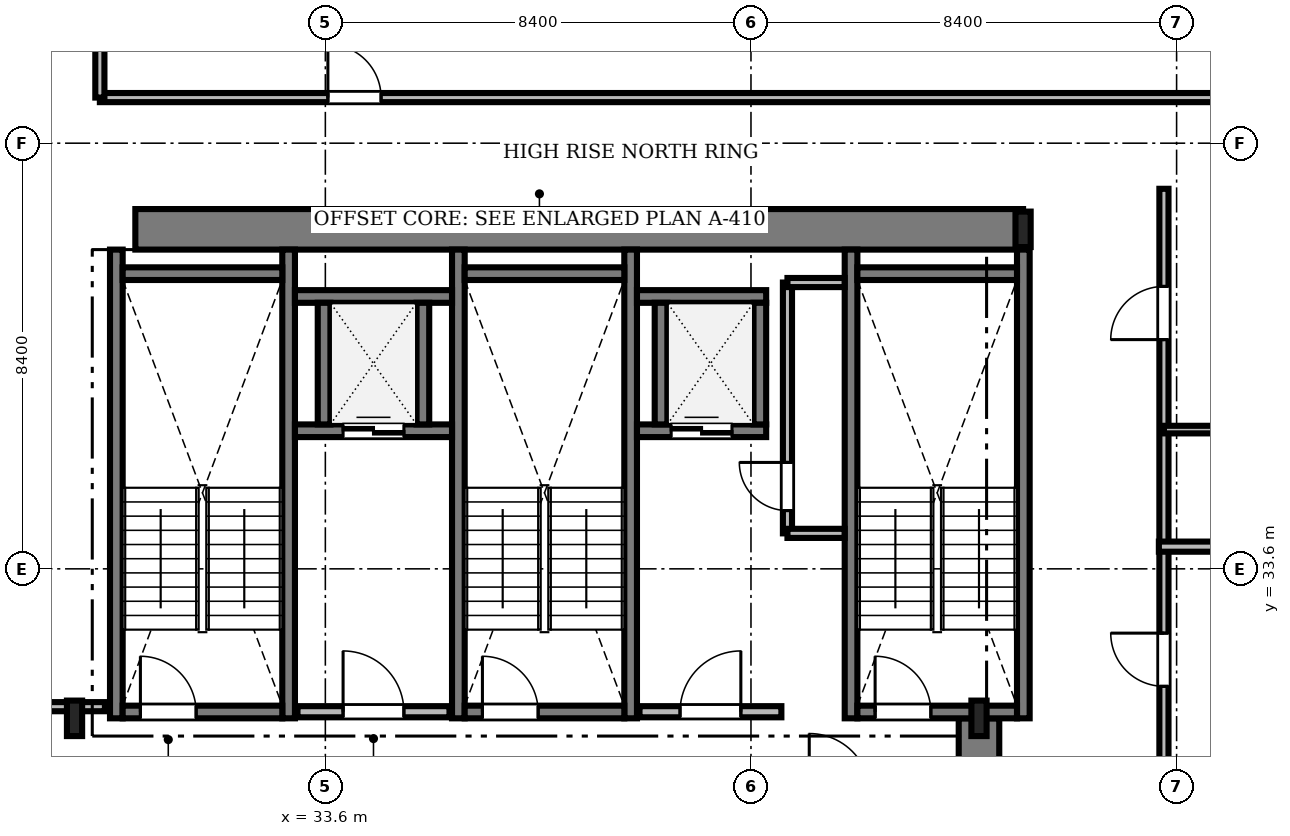
"""IFC4 building model, lengths in metres.
Left out: names, types, materials, properties, quantities, classifications, styles, units other than length and angle.
Written with IfcOpenShell. Run it as: python <this file> out.ifc"""

import sys

from ifc_helpers import new_model, si_unit, direction, frame, frame_2d, origin, origin_2d, place, context, subcontext, project, spatial, rectangle, i_section, extrude, source, transform, mapped, element, fill, save


model = new_model("IFC4")
c1 = context("Model", 3, precision=1e-05, world=origin(), true_north=direction((0.0, 1.0)))
c2 = subcontext(c1, "Body", "Model", "MODEL_VIEW")
j1 = project(units=[si_unit("LENGTHUNIT", "METRE"), si_unit("PLANEANGLEUNIT", "RADIAN")], contexts=[c1])
p1 = place(None, origin())
s1 = spatial("IfcSite", under=j1, at=p1, CompositionType="ELEMENT")
p2 = place(p1, origin())
s2 = spatial("IfcBuilding", under=s1, at=p2, CompositionType="ELEMENT")
p3 = place(p2, frame((0.0, 0.0, 214.8)))
s3 = spatial("IfcBuildingStorey", under=s2, at=p3, CompositionType="ELEMENT", Elevation=214.8)
m1 = source(origin(), c2, "Body", "SweptSolid", [
    extrude(rectangle(XDim=17.52, YDim=0.8, at=frame_2d((8.76, 0.0))), origin(), (0.0, 0.0, 1.0), 3.53),
])
p4 = place(p3, frame((29.85, 40.3, 0.0), z_axis=(0.0, 0.0, 1.0), x_axis=(1.0, 0.0, 0.0)))
e1 = element("IfcWall", 1, at=p4, inside=s3, PredefinedType="SHEAR", context=c2, shape_type="MappedRepresentation", body=[
    mapped(m1, transform((0.0, 0.0, 0.0), scale=1.0)),
])
m2 = source(origin(), c2, "Body", "SweptSolid", [
    extrude(rectangle(XDim=13.15, YDim=0.8, at=frame_2d((6.575, 0.0))), origin(), (0.0, 0.0, 1.0), 3.53),
])
p5 = place(p3, frame((46.5, 17.5, 0.0), z_axis=(0.0, 0.0, 1.0), x_axis=(0.0, 1.0, 0.0)))
e2 = element("IfcWall", 2, at=p5, inside=s3, PredefinedType="SHEAR", context=c2, shape_type="MappedRepresentation", body=[
    mapped(m2, transform((0.0, 0.0, 0.0), scale=1.0)),
])
m3 = source(origin(), c2, "Body", "SweptSolid", [
    extrude(i_section(OverallWidth=0.3, OverallDepth=0.7, WebThickness=0.017, FlangeThickness=0.032, FilletRadius=0.027, at=origin_2d()), origin(), (0.0, 0.0, 1.0), 3.53),
])
for number, where, z_axis, x_axis in (
    (3, (28.65, 30.65, 0.0), (0.0, 0.0, 1.0), (1.0, 0.0, 0.0)),
    (4, (46.5, 30.65, 0.0), (0.0, 0.0, 1.0), (1.0, 0.0, 0.0)),
    (5, (47.37, 40.3, 0.0), (0.0, 0.0, 1.0), (1.0, 0.0, 0.0)),
):
    element("IfcColumn", number, at=place(p3, frame(where, z_axis=z_axis, x_axis=x_axis)), inside=s3, PredefinedType="COLUMN", context=c2, shape_type="MappedRepresentation", body=[
        mapped(m3, transform((0.0, 0.0, 0.0), scale=1.0)),
    ])
m4 = source(origin(), c2, "Body", "SweptSolid", [
    extrude(rectangle(XDim=9.25, YDim=0.25, at=frame_2d((4.625, 0.0))), origin(), (0.0, 0.0, 1.0), 3.55),
])
for number, where, z_axis, x_axis in (
    (6, (29.475, 30.65, 0.0), (0.0, 0.0, 1.0), (0.0, 1.0, 0.0)),
    (7, (32.875, 30.65, 0.0), (0.0, 0.0, 1.0), (0.0, 1.0, 0.0)),
):
    element("IfcWall", number, at=place(p3, frame(where, z_axis=z_axis, x_axis=x_axis)), inside=s3, PredefinedType="SOLIDWALL", context=c2, shape_type="MappedRepresentation", body=[
        mapped(m4, transform((0.0, 0.0, 0.0), scale=1.0)),
    ])
m5 = source(origin(), c2, "Body", "SweptSolid", [
    extrude(rectangle(XDim=3.15, YDim=0.25, at=frame_2d((1.575, 0.0))), origin(), (0.0, 0.0, 1.0), 3.55),
])
p6 = place(p3, frame((29.6, 39.425, 0.0), z_axis=(0.0, 0.0, 1.0), x_axis=(1.0, 0.0, 0.0)))
e8 = element("IfcWall", 8, at=p6, inside=s3, PredefinedType="SOLIDWALL", context=c2, shape_type="MappedRepresentation", body=[
    mapped(m5, transform((0.0, 0.0, 0.0), scale=1.0)),
])
p7 = place(p3, frame((29.6, 30.775, 0.0), z_axis=(0.0, 0.0, 1.0), x_axis=(1.0, 0.0, 0.0)))
e9 = element("IfcWall", 9, at=p7, inside=s3, PredefinedType="SOLIDWALL", context=c2, shape_type="MappedRepresentation", body=[
    mapped(m5, transform((0.0, 0.0, 0.0), scale=1.0)),
])
m6 = source(origin(), c2, "Body", "SweptSolid", [
    extrude(rectangle(XDim=1.1, YDim=2.2, at=frame_2d((0.55, 1.1))), frame((0.0, 0.135, 0.0), z_axis=(0.0, -1.0, 0.0), x_axis=(1.0, 0.0, 0.0)), (0.0, 0.0, 1.0), 0.27),
])
p8 = place(p7, frame((0.35, 0.0, 0.0)))
e10 = element("IfcOpeningElement", 10, at=p8, cuts=e9, PredefinedType="OPENING", context=c2, shape_type="MappedRepresentation", body=[
    mapped(m6, transform((0.0, 0.0, 0.0), scale=1.0)),
])
for number, where, z_axis, x_axis in (
    (11, (36.225, 30.65, 0.0), (0.0, 0.0, 1.0), (0.0, 1.0, 0.0)),
    (12, (39.625, 30.65, 0.0), (0.0, 0.0, 1.0), (0.0, 1.0, 0.0)),
):
    element("IfcWall", number, at=place(p3, frame(where, z_axis=z_axis, x_axis=x_axis)), inside=s3, PredefinedType="SOLIDWALL", context=c2, shape_type="MappedRepresentation", body=[
        mapped(m4, transform((0.0, 0.0, 0.0), scale=1.0)),
    ])
p9 = place(p3, frame((36.35, 39.425, 0.0), z_axis=(0.0, 0.0, 1.0), x_axis=(1.0, 0.0, 0.0)))
e13 = element("IfcWall", 13, at=p9, inside=s3, PredefinedType="SOLIDWALL", context=c2, shape_type="MappedRepresentation", body=[
    mapped(m5, transform((0.0, 0.0, 0.0), scale=1.0)),
])
p10 = place(p3, frame((36.35, 30.775, 0.0), z_axis=(0.0, 0.0, 1.0), x_axis=(1.0, 0.0, 0.0)))
e14 = element("IfcWall", 14, at=p10, inside=s3, PredefinedType="SOLIDWALL", context=c2, shape_type="MappedRepresentation", body=[
    mapped(m5, transform((0.0, 0.0, 0.0), scale=1.0)),
])
p11 = place(p10, frame((0.35, 0.0, 0.0)))
e15 = element("IfcOpeningElement", 15, at=p11, cuts=e14, PredefinedType="OPENING", context=c2, shape_type="MappedRepresentation", body=[
    mapped(m6, transform((0.0, 0.0, 0.0), scale=1.0)),
])
for number, where, z_axis, x_axis in (
    (16, (43.975, 30.65, 0.0), (0.0, 0.0, 1.0), (0.0, 1.0, 0.0)),
    (17, (47.375, 30.65, 0.0), (0.0, 0.0, 1.0), (0.0, 1.0, 0.0)),
):
    element("IfcWall", number, at=place(p3, frame(where, z_axis=z_axis, x_axis=x_axis)), inside=s3, PredefinedType="SOLIDWALL", context=c2, shape_type="MappedRepresentation", body=[
        mapped(m4, transform((0.0, 0.0, 0.0), scale=1.0)),
    ])
p12 = place(p3, frame((44.1, 39.425, 0.0), z_axis=(0.0, 0.0, 1.0), x_axis=(1.0, 0.0, 0.0)))
e18 = element("IfcWall", 18, at=p12, inside=s3, PredefinedType="SOLIDWALL", context=c2, shape_type="MappedRepresentation", body=[
    mapped(m5, transform((0.0, 0.0, 0.0), scale=1.0)),
])
p13 = place(p3, frame((44.1, 30.775, 0.0), z_axis=(0.0, 0.0, 1.0), x_axis=(1.0, 0.0, 0.0)))
e19 = element("IfcWall", 19, at=p13, inside=s3, PredefinedType="SOLIDWALL", context=c2, shape_type="MappedRepresentation", body=[
    mapped(m5, transform((0.0, 0.0, 0.0), scale=1.0)),
])
p14 = place(p13, frame((0.35, 0.0, 0.0)))
e20 = element("IfcOpeningElement", 20, at=p14, cuts=e19, PredefinedType="OPENING", context=c2, shape_type="MappedRepresentation", body=[
    mapped(m6, transform((0.0, 0.0, 0.0), scale=1.0)),
])
m7 = source(origin(), c2, "Body", "SweptSolid", [
    extrude(rectangle(XDim=3.0, YDim=0.22, at=frame_2d((1.5, 0.0))), origin(), (0.0, 0.0, 1.0), 3.53),
])
p15 = place(p3, frame((33.05, 30.78, 0.0), z_axis=(0.0, 0.0, 1.0), x_axis=(1.0, 0.0, 0.0)))
e21 = element("IfcWall", 21, at=p15, inside=s3, PredefinedType="SOLIDWALL", context=c2, shape_type="MappedRepresentation", body=[
    mapped(m7, transform((0.0, 0.0, 0.0), scale=1.0)),
])
m8 = source(origin(), c2, "Body", "SweptSolid", [
    extrude(rectangle(XDim=1.2, YDim=2.2, at=frame_2d((0.6, 1.1))), frame((0.0, 0.12, 0.0), z_axis=(0.0, -1.0, 0.0), x_axis=(1.0, 0.0, 0.0)), (0.0, 0.0, 1.0), 0.24),
])
p16 = place(p15, frame((0.9, 0.0, 0.0)))
e22 = element("IfcOpeningElement", 22, at=p16, cuts=e21, PredefinedType="OPENING", context=c2, shape_type="MappedRepresentation", body=[
    mapped(m8, transform((0.0, 0.0, 0.0), scale=1.0)),
])
m9 = source(origin(), c2, "Body", "SweptSolid", [
    extrude(rectangle(XDim=2.8, YDim=0.22, at=frame_2d((1.4, 0.0))), origin(), (0.0, 0.0, 1.0), 3.53),
])
p17 = place(p3, frame((39.8, 30.78, 0.0), z_axis=(0.0, 0.0, 1.0), x_axis=(1.0, 0.0, 0.0)))
e23 = element("IfcWall", 23, at=p17, inside=s3, PredefinedType="SOLIDWALL", context=c2, shape_type="MappedRepresentation", body=[
    mapped(m9, transform((0.0, 0.0, 0.0), scale=1.0)),
])
p18 = place(p17, frame((0.8, 0.0, 0.0)))
e24 = element("IfcOpeningElement", 24, at=p18, cuts=e23, PredefinedType="OPENING", context=c2, shape_type="MappedRepresentation", body=[
    mapped(m8, transform((0.0, 0.0, 0.0), scale=1.0)),
])
m10 = source(origin(), c2, "Body", "SweptSolid", [
    extrude(rectangle(XDim=3.1, YDim=0.25, at=frame_2d((1.55, 0.0))), origin(), (0.0, 0.0, 1.0), 3.53),
])
p19 = place(p3, frame((33.0, 36.325, 0.0), z_axis=(0.0, 0.0, 1.0), x_axis=(1.0, 0.0, 0.0)))
e25 = element("IfcWall", 25, at=p19, inside=s3, PredefinedType="SOLIDWALL", context=c2, shape_type="MappedRepresentation", body=[
    mapped(m10, transform((0.0, 0.0, 0.0), scale=1.0)),
])
m11 = source(origin(), c2, "Body", "SweptSolid", [
    extrude(rectangle(XDim=1.2, YDim=2.25, at=frame_2d((0.6, 1.125))), frame((0.0, 0.135, 0.0), z_axis=(0.0, -1.0, 0.0), x_axis=(1.0, 0.0, 0.0)), (0.0, 0.0, 1.0), 0.27),
])
p20 = place(p19, frame((0.95, 0.0, 0.0)))
e26 = element("IfcOpeningElement", 26, at=p20, cuts=e25, PredefinedType="OPENING", context=c2, shape_type="MappedRepresentation", body=[
    mapped(m11, transform((0.0, 0.0, 0.0), scale=1.0)),
])
p21 = place(p3, frame((33.0, 38.975, 0.0), z_axis=(0.0, 0.0, 1.0), x_axis=(1.0, 0.0, 0.0)))
e27 = element("IfcWall", 27, at=p21, inside=s3, PredefinedType="SOLIDWALL", context=c2, shape_type="MappedRepresentation", body=[
    mapped(m10, transform((0.0, 0.0, 0.0), scale=1.0)),
])
m12 = source(origin(), c2, "Body", "SweptSolid", [
    extrude(rectangle(XDim=2.4, YDim=0.25, at=frame_2d((1.2, 0.0))), origin(), (0.0, 0.0, 1.0), 3.53),
])
for number, where, z_axis, x_axis in (
    (28, (33.575, 36.45, 0.0), (0.0, 0.0, 1.0), (0.0, 1.0, 0.0)),
    (29, (35.525, 36.45, 0.0), (0.0, 0.0, 1.0), (0.0, 1.0, 0.0)),
):
    element("IfcWall", number, at=place(p3, frame(where, z_axis=z_axis, x_axis=x_axis)), inside=s3, PredefinedType="SOLIDWALL", context=c2, shape_type="MappedRepresentation", body=[
        mapped(m12, transform((0.0, 0.0, 0.0), scale=1.0)),
    ])
m13 = source(origin(), c2, "Body", "SweptSolid", [
    extrude(rectangle(XDim=2.55, YDim=0.25, at=frame_2d((1.275, 0.0))), origin(), (0.0, 0.0, 1.0), 3.53),
])
p22 = place(p3, frame((39.75, 36.325, 0.0), z_axis=(0.0, 0.0, 1.0), x_axis=(1.0, 0.0, 0.0)))
e30 = element("IfcWall", 30, at=p22, inside=s3, PredefinedType="SOLIDWALL", context=c2, shape_type="MappedRepresentation", body=[
    mapped(m13, transform((0.0, 0.0, 0.0), scale=1.0)),
])
p23 = place(p22, frame((0.675, 0.0, 0.0)))
e31 = element("IfcOpeningElement", 31, at=p23, cuts=e30, PredefinedType="OPENING", context=c2, shape_type="MappedRepresentation", body=[
    mapped(m11, transform((0.0, 0.0, 0.0), scale=1.0)),
])
p24 = place(p3, frame((39.75, 38.975, 0.0), z_axis=(0.0, 0.0, 1.0), x_axis=(1.0, 0.0, 0.0)))
e32 = element("IfcWall", 32, at=p24, inside=s3, PredefinedType="SOLIDWALL", context=c2, shape_type="MappedRepresentation", body=[
    mapped(m13, transform((0.0, 0.0, 0.0), scale=1.0)),
])
for number, where, z_axis, x_axis in (
    (33, (40.225, 36.45, 0.0), (0.0, 0.0, 1.0), (0.0, 1.0, 0.0)),
    (34, (42.175, 36.45, 0.0), (0.0, 0.0, 1.0), (0.0, 1.0, 0.0)),
):
    element("IfcWall", number, at=place(p3, frame(where, z_axis=z_axis, x_axis=x_axis)), inside=s3, PredefinedType="SOLIDWALL", context=c2, shape_type="MappedRepresentation", body=[
        mapped(m12, transform((0.0, 0.0, 0.0), scale=1.0)),
    ])
m14 = source(origin(), c2, "Body", "SweptSolid", [
    extrude(rectangle(XDim=28.428, YDim=0.18, at=frame_2d((14.214, 0.0))), origin(), (0.0, 0.0, 1.0), 2.772),
])
p25 = place(p3, frame((29.15, 42.9, 0.0), z_axis=(0.0, 0.0, 1.0), x_axis=(1.0, 0.0, 0.0)))
e35 = element("IfcWall", 35, at=p25, inside=s3, PredefinedType="PARTITIONING", context=c2, shape_type="MappedRepresentation", body=[
    mapped(m14, transform((0.0, 0.0, 0.0), scale=1.0)),
])
m15 = source(origin(), c2, "Body", "SweptSolid", [
    extrude(rectangle(XDim=1.05, YDim=2.2, at=frame_2d((0.525, 1.1))), frame((0.0, 0.1, 0.0), z_axis=(0.0, -1.0, 0.0), x_axis=(1.0, 0.0, 0.0)), (0.0, 0.0, 1.0), 0.2),
])
p26 = place(p25, frame((4.5, 0.0, 0.0)))
e36 = element("IfcOpeningElement", 36, at=p26, cuts=e35, PredefinedType="OPENING", context=c2, shape_type="MappedRepresentation", body=[
    mapped(m15, transform((0.0, 0.0, 0.0), scale=1.0)),
])
m16 = source(origin(), c2, "Body", "SweptSolid", [
    extrude(rectangle(XDim=27.59, YDim=0.18, at=frame_2d((13.795, 0.0))), origin(), (0.0, 0.0, 1.0), 2.972),
])
p27 = place(p3, frame((50.15, 13.51, 0.0), z_axis=(0.0, 0.0, 1.0), x_axis=(0.0, 1.0, 0.0)))
e37 = element("IfcWall", 37, at=p27, inside=s3, PredefinedType="PARTITIONING", context=c2, shape_type="MappedRepresentation", body=[
    mapped(m16, transform((0.0, 0.0, 0.0), scale=1.0)),
])
p28 = place(p27, frame((4.086, 0.0, 0.0)))
e38 = element("IfcOpeningElement", 38, at=p28, cuts=e37, PredefinedType="OPENING", context=c2, shape_type="MappedRepresentation", body=[
    mapped(m15, transform((0.0, 0.0, 0.0), scale=1.0)),
])
p29 = place(p27, frame((9.744, 0.0, 0.0)))
e39 = element("IfcOpeningElement", 39, at=p29, cuts=e37, PredefinedType="OPENING", context=c2, shape_type="MappedRepresentation", body=[
    mapped(m15, transform((0.0, 0.0, 0.0), scale=1.0)),
])
p30 = place(p27, frame((17.771, 0.0, 0.0)))
e40 = element("IfcOpeningElement", 40, at=p30, cuts=e37, PredefinedType="OPENING", context=c2, shape_type="MappedRepresentation", body=[
    mapped(m15, transform((0.0, 0.0, 0.0), scale=1.0)),
])
p31 = place(p27, frame((24.614, 0.0, 0.0)))
e41 = element("IfcOpeningElement", 41, at=p31, cuts=e37, PredefinedType="OPENING", context=c2, shape_type="MappedRepresentation", body=[
    mapped(m15, transform((0.0, 0.0, 0.0), scale=1.0)),
])
m17 = source(origin(), c2, "Body", "SweptSolid", [
    extrude(rectangle(XDim=17.828, YDim=0.18, at=frame_2d((8.914, 0.0))), origin(), (0.0, 0.0, 1.0), 2.772),
])
p32 = place(p3, frame((11.422, 30.88, 0.0), z_axis=(0.0, 0.0, 1.0), x_axis=(1.0, 0.0, 0.0)))
e42 = element("IfcWall", 42, at=p32, inside=s3, PredefinedType="PARTITIONING", context=c2, shape_type="MappedRepresentation", body=[
    mapped(m17, transform((0.0, 0.0, 0.0), scale=1.0)),
])
p33 = place(p32, frame((10.778, 0.0, 0.0)))
e43 = element("IfcOpeningElement", 43, at=p33, cuts=e42, PredefinedType="OPENING", context=c2, shape_type="MappedRepresentation", body=[
    mapped(m15, transform((0.0, 0.0, 0.0), scale=1.0)),
])
m18 = source(origin(), c2, "Body", "SweptSolid", [
    extrude(rectangle(XDim=4.95, YDim=0.18, at=frame_2d((2.475, 0.0))), origin(), (0.0, 0.0, 1.0), 3.53),
])
p34 = place(p3, frame((42.72, 34.3, 0.0), z_axis=(0.0, 0.0, 1.0), x_axis=(0.0, 1.0, 0.0)))
e44 = element("IfcWall", 44, at=p34, inside=s3, PredefinedType="PARTITIONING", context=c2, shape_type="MappedRepresentation", body=[
    mapped(m18, transform((0.0, 0.0, 0.0), scale=1.0)),
])
m19 = source(origin(), c2, "Body", "SweptSolid", [
    extrude(rectangle(XDim=0.95, YDim=2.15, at=frame_2d((0.475, 1.075))), frame((0.0, 0.1, 0.0), z_axis=(0.0, -1.0, 0.0), x_axis=(1.0, 0.0, 0.0)), (0.0, 0.0, 1.0), 0.2),
])
p35 = place(p34, frame((0.45, 0.0, 0.0)))
e45 = element("IfcOpeningElement", 45, at=p35, cuts=e44, PredefinedType="OPENING", context=c2, shape_type="MappedRepresentation", body=[
    mapped(m19, transform((0.0, 0.0, 0.0), scale=1.0)),
])
m20 = source(origin(), c2, "Body", "SweptSolid", [
    extrude(rectangle(XDim=7.528, YDim=0.2, at=frame_2d((3.764, 0.0))), origin(), (0.0, 0.0, 1.0), 2.772),
])
p36 = place(p3, frame((50.05, 34.038, 0.0), z_axis=(0.0, 0.0, 1.0), x_axis=(1.0, 0.0, 0.0)))
e46 = element("IfcWall", 46, at=p36, inside=s3, PredefinedType="PARTITIONING", context=c2, shape_type="MappedRepresentation", body=[
    mapped(m20, transform((0.0, 0.0, 0.0), scale=1.0)),
])
m21 = source(origin(), c2, "Body", "SweptSolid", [
    extrude(rectangle(XDim=5.378, YDim=0.18, at=frame_2d((2.689, 0.0))), origin(), (0.0, 0.0, 1.0), 2.772),
])
p37 = place(p3, frame((29.15, 42.9, 0.0), z_axis=(0.0, 0.0, 1.0), x_axis=(0.0, 1.0, 0.0)))
e47 = element("IfcWall", 47, at=p37, inside=s3, PredefinedType="PARTITIONING", context=c2, shape_type="MappedRepresentation", body=[
    mapped(m21, transform((0.0, 0.0, 0.0), scale=1.0)),
])
m22 = source(origin(), c2, "Body", "SweptSolid", [
    extrude(rectangle(XDim=2.36, YDim=0.15, at=frame_2d((1.18, 0.0))), origin(), (0.0, 0.0, 1.0), 3.53),
])
p38 = place(p3, frame((50.15, 36.348, 0.0), z_axis=(0.0, 0.0, 1.0), x_axis=(1.0, 0.0, 0.0)))
e48 = element("IfcWall", 48, at=p38, inside=s3, PredefinedType="PARTITIONING", context=c2, shape_type="MappedRepresentation", body=[
    mapped(m22, transform((0.0, 0.0, 0.0), scale=1.0)),
])
m23 = source(origin(), c2, "Body", "SweptSolid", [
    extrude(rectangle(XDim=1.128, YDim=0.18, at=frame_2d((0.564, 0.0))), origin(), (0.0, 0.0, 1.0), 3.53),
])
for number, where, z_axis, x_axis in (
    (49, (42.72, 34.3, 0.0), (0.0, 0.0, 1.0), (1.0, 0.0, 0.0)),
    (50, (42.72, 39.25, 0.0), (0.0, 0.0, 1.0), (1.0, 0.0, 0.0)),
):
    element("IfcWall", number, at=place(p3, frame(where, z_axis=z_axis, x_axis=x_axis)), inside=s3, PredefinedType="PARTITIONING", context=c2, shape_type="MappedRepresentation", body=[
        mapped(m23, transform((0.0, 0.0, 0.0), scale=1.0)),
    ])
m24 = source(origin(), c2, "Body", "SweptSolid", [
    extrude(rectangle(XDim=1.1, YDim=2.2, at=frame_2d((0.55, 1.1))), frame((0.0, 0.025, 0.0), z_axis=(0.0, -1.0, 0.0), x_axis=(1.0, 0.0, 0.0)), (0.0, 0.0, 1.0), 0.05),
])
p39 = place(p8, origin())
e51 = element("IfcDoor", 51, at=p39, inside=s3, OperationType="SINGLE_SWING_LEFT", PredefinedType="DOOR", context=c2, shape_type="MappedRepresentation", body=[
    mapped(m24, transform((0.0, 0.0, 0.0), scale=1.0)),
])
fill(e10, e51)
p40 = place(p11, origin())
e52 = element("IfcDoor", 52, at=p40, inside=s3, OperationType="SINGLE_SWING_LEFT", PredefinedType="DOOR", context=c2, shape_type="MappedRepresentation", body=[
    mapped(m24, transform((0.0, 0.0, 0.0), scale=1.0)),
])
fill(e15, e52)
p41 = place(p14, origin())
e53 = element("IfcDoor", 53, at=p41, inside=s3, OperationType="SINGLE_SWING_LEFT", PredefinedType="DOOR", context=c2, shape_type="MappedRepresentation", body=[
    mapped(m24, transform((0.0, 0.0, 0.0), scale=1.0)),
])
fill(e20, e53)
m25 = source(origin(), c2, "Body", "SweptSolid", [
    extrude(rectangle(XDim=1.2, YDim=2.2, at=frame_2d((0.6, 1.1))), frame((0.0, 0.025, 0.0), z_axis=(0.0, -1.0, 0.0), x_axis=(1.0, 0.0, 0.0)), (0.0, 0.0, 1.0), 0.05),
])
p42 = place(p16, origin())
e54 = element("IfcDoor", 54, at=p42, inside=s3, OperationType="SINGLE_SWING_LEFT", PredefinedType="DOOR", context=c2, shape_type="MappedRepresentation", body=[
    mapped(m25, transform((0.0, 0.0, 0.0), scale=1.0)),
])
fill(e22, e54)
p43 = place(p18, origin())
e55 = element("IfcDoor", 55, at=p43, inside=s3, OperationType="SINGLE_SWING_RIGHT", PredefinedType="DOOR", context=c2, shape_type="MappedRepresentation", body=[
    mapped(m25, transform((0.0, 0.0, 0.0), scale=1.0)),
])
fill(e24, e55)
m26 = source(origin(), c2, "Body", "SweptSolid", [
    extrude(rectangle(XDim=1.2, YDim=2.25, at=frame_2d((0.6, 1.125))), frame((0.0, 0.025, 0.0), z_axis=(0.0, -1.0, 0.0), x_axis=(1.0, 0.0, 0.0)), (0.0, 0.0, 1.0), 0.05),
])
p44 = place(p20, origin())
e56 = element("IfcDoor", 56, at=p44, inside=s3, OperationType="DOUBLE_DOOR_SLIDING", PredefinedType="DOOR", context=c2, shape_type="MappedRepresentation", body=[
    mapped(m26, transform((0.0, 0.0, 0.0), scale=1.0)),
])
fill(e26, e56)
p45 = place(p23, origin())
e57 = element("IfcDoor", 57, at=p45, inside=s3, OperationType="DOUBLE_DOOR_SLIDING", PredefinedType="DOOR", context=c2, shape_type="MappedRepresentation", body=[
    mapped(m26, transform((0.0, 0.0, 0.0), scale=1.0)),
])
fill(e31, e57)
m27 = source(origin(), c2, "Body", "SweptSolid", [
    extrude(rectangle(XDim=1.05, YDim=2.2, at=frame_2d((0.525, 1.1))), frame((0.0, 0.025, 0.0), z_axis=(0.0, -1.0, 0.0), x_axis=(1.0, 0.0, 0.0)), (0.0, 0.0, 1.0), 0.05),
])
p46 = place(p26, origin())
e58 = element("IfcDoor", 58, at=p46, inside=s3, OperationType="SINGLE_SWING_LEFT", PredefinedType="DOOR", context=c2, shape_type="MappedRepresentation", body=[
    mapped(m27, transform((0.0, 0.0, 0.0), scale=1.0)),
])
fill(e36, e58)
p47 = place(p30, origin())
e59 = element("IfcDoor", 59, at=p47, inside=s3, OperationType="SINGLE_SWING_RIGHT", PredefinedType="DOOR", context=c2, shape_type="MappedRepresentation", body=[
    mapped(m27, transform((0.0, 0.0, 0.0), scale=1.0)),
])
fill(e40, e59)
p48 = place(p31, origin())
e60 = element("IfcDoor", 60, at=p48, inside=s3, OperationType="SINGLE_SWING_LEFT", PredefinedType="DOOR", context=c2, shape_type="MappedRepresentation", body=[
    mapped(m27, transform((0.0, 0.0, 0.0), scale=1.0)),
])
fill(e41, e60)
m28 = source(origin(), c2, "Body", "SweptSolid", [
    extrude(rectangle(XDim=0.95, YDim=2.15, at=frame_2d((0.475, 1.075))), frame((0.0, 0.025, 0.0), z_axis=(0.0, -1.0, 0.0), x_axis=(1.0, 0.0, 0.0)), (0.0, 0.0, 1.0), 0.05),
])
p49 = place(p35, origin())
e61 = element("IfcDoor", 61, at=p49, inside=s3, OperationType="SINGLE_SWING_RIGHT", PredefinedType="DOOR", context=c2, shape_type="MappedRepresentation", body=[
    mapped(m28, transform((0.0, 0.0, 0.0), scale=1.0)),
])
fill(e45, e61)
save(model, sys.argv[1])
